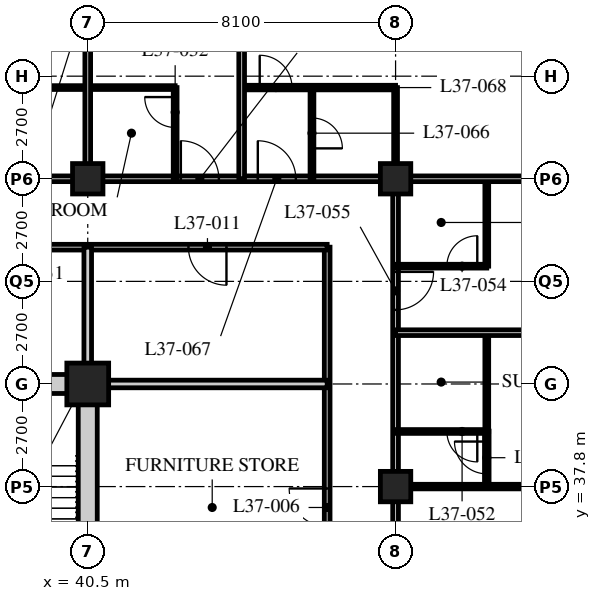
"""IFC4 building model, lengths in metres.
Left out: names, types, materials, properties, quantities, classifications, styles, units other than length and angle.
Written with IfcOpenShell. Run it as: python <this file> out.ifc"""

import sys

from ifc_helpers import new_model, si_unit, direction, frame, frame_2d, origin, origin_2d, place, context, subcontext, project, spatial, rectangle, hollow_rectangle, extrude, element, fill, save


model = new_model("IFC4")
c1 = context("Model", 3, precision=1e-05, world=origin(), true_north=direction((0.0, 1.0)))
c2 = subcontext(c1, "Body", "Model", "MODEL_VIEW")
j1 = project(units=[si_unit("LENGTHUNIT", "METRE"), si_unit("PLANEANGLEUNIT", "RADIAN")], contexts=[c1])
p1 = place(None, origin())
s1 = spatial("IfcSite", under=j1, at=p1, CompositionType="ELEMENT")
p2 = place(p1, origin())
s2 = spatial("IfcBuilding", under=s1, at=p2, CompositionType="ELEMENT")
p3 = place(p2, frame((0.0, 0.0, 144.2)))
s3 = spatial("IfcBuildingStorey", under=s2, at=p3, CompositionType="ELEMENT", Elevation=144.2)
p4 = place(p3, frame((40.5, 40.5, 0.0), z_axis=(0.0, 0.0, 1.0), x_axis=(1.0, 0.0, 0.0)))
e1 = element("IfcColumn", 1, at=p4, inside=s3, PredefinedType="COLUMN", context=c2, shape_type="SweptSolid", body=[
    extrude(hollow_rectangle(XDim=1.1, YDim=1.1, WallThickness=0.1, at=origin_2d()), origin(), (0.0, 0.0, 1.0), 3.4),
])
for number, where, z_axis, x_axis in (
    (2, (40.5, 45.9, 0.0), (0.0, 0.0, 1.0), (1.0, 0.0, 0.0)),
    (3, (48.6, 37.8, 0.0), (0.0, 0.0, 1.0), (1.0, 0.0, 0.0)),
    (4, (48.6, 45.9, 0.0), (0.0, 0.0, 1.0), (1.0, 0.0, 0.0)),
):
    element("IfcColumn", number, at=place(p3, frame(where, z_axis=z_axis, x_axis=x_axis)), inside=s3, PredefinedType="COLUMN", context=c2, shape_type="SweptSolid", body=[
        extrude(hollow_rectangle(XDim=0.8, YDim=0.8, WallThickness=0.08, at=origin_2d()), origin(), (0.0, 0.0, 1.0), 3.4),
    ])
p5 = place(p3, frame((12.15, 45.9, 0.0), z_axis=(0.0, 0.0, 1.0), x_axis=(1.0, 0.0, 0.0)))
e5 = element("IfcWall", 5, at=p5, inside=s3, PredefinedType="PARTITIONING", context=c2, shape_type="SweptSolid", body=[
    extrude(rectangle(XDim=36.45, YDim=0.15, at=frame_2d((18.225, 0.0))), origin(), (0.0, 0.0, 1.0), 2.42),
])
p6 = place(p5, frame((9.225, 0.0, 0.0)))
e6 = element("IfcOpeningElement", 6, at=p6, cuts=e5, PredefinedType="OPENING", context=c2, shape_type="SweptSolid", body=[
    extrude(rectangle(XDim=1.8, YDim=2.4, at=frame_2d((0.9, 1.2))), frame((0.0, 0.085, 0.0), z_axis=(0.0, -1.0, 0.0), x_axis=(1.0, 0.0, 0.0)), (0.0, 0.0, 1.0), 0.17),
])
p7 = place(p5, frame((21.65, 0.0, 0.0)))
e7 = element("IfcOpeningElement", 7, at=p7, cuts=e5, PredefinedType="OPENING", context=c2, shape_type="SweptSolid", body=[
    extrude(rectangle(XDim=1.0, YDim=2.1, at=frame_2d((0.5, 1.05))), frame((0.0, 0.085, 0.0), z_axis=(0.0, -1.0, 0.0), x_axis=(1.0, 0.0, 0.0)), (0.0, 0.0, 1.0), 0.17),
])
p8 = place(p5, frame((24.9, 0.0, 0.0)))
e8 = element("IfcOpeningElement", 8, at=p8, cuts=e5, PredefinedType="OPENING", context=c2, shape_type="SweptSolid", body=[
    extrude(rectangle(XDim=1.0, YDim=2.1, at=frame_2d((0.5, 1.05))), frame((0.0, 0.085, 0.0), z_axis=(0.0, -1.0, 0.0), x_axis=(1.0, 0.0, 0.0)), (0.0, 0.0, 1.0), 0.17),
])
p9 = place(p5, frame((30.8, 0.0, 0.0)))
e9 = element("IfcOpeningElement", 9, at=p9, cuts=e5, PredefinedType="OPENING", context=c2, shape_type="SweptSolid", body=[
    extrude(rectangle(XDim=1.0, YDim=2.1, at=frame_2d((0.5, 1.05))), frame((0.0, 0.085, 0.0), z_axis=(0.0, -1.0, 0.0), x_axis=(1.0, 0.0, 0.0)), (0.0, 0.0, 1.0), 0.17),
])
p10 = place(p5, frame((32.825, 0.0, 0.0)))
e10 = element("IfcOpeningElement", 10, at=p10, cuts=e5, PredefinedType="OPENING", context=c2, shape_type="SweptSolid", body=[
    extrude(rectangle(XDim=1.0, YDim=2.1, at=frame_2d((0.5, 1.05))), frame((0.0, 0.085, 0.0), z_axis=(0.0, -1.0, 0.0), x_axis=(1.0, 0.0, 0.0)), (0.0, 0.0, 1.0), 0.17),
])
p11 = place(p5, frame((1.525, 0.0, 0.0)))
e11 = element("IfcOpeningElement", 11, at=p11, cuts=e5, PredefinedType="OPENING", context=c2, shape_type="SweptSolid", body=[
    extrude(rectangle(XDim=1.0, YDim=2.1, at=frame_2d((0.5, 1.05))), frame((0.0, 0.085, 0.0), z_axis=(0.0, -1.0, 0.0), x_axis=(1.0, 0.0, 0.0)), (0.0, 0.0, 1.0), 0.17),
])
p12 = place(p3, frame((48.6, 21.6, 0.0), z_axis=(0.0, 0.0, 1.0), x_axis=(0.0, 1.0, 0.0)))
e12 = element("IfcWall", 12, at=p12, inside=s3, PredefinedType="PARTITIONING", context=c2, shape_type="SweptSolid", body=[
    extrude(rectangle(XDim=24.3, YDim=0.15, at=frame_2d((12.15, 0.0))), origin(), (0.0, 0.0, 1.0), 2.42),
])
p13 = place(p12, frame((2.75, 0.0, 0.0)))
e13 = element("IfcOpeningElement", 13, at=p13, cuts=e12, PredefinedType="OPENING", context=c2, shape_type="SweptSolid", body=[
    extrude(rectangle(XDim=1.0, YDim=2.1, at=frame_2d((0.5, 1.05))), frame((0.0, 0.085, 0.0), z_axis=(0.0, -1.0, 0.0), x_axis=(1.0, 0.0, 0.0)), (0.0, 0.0, 1.0), 0.17),
])
p14 = place(p12, frame((4.65, 0.0, 0.0)))
e14 = element("IfcOpeningElement", 14, at=p14, cuts=e12, PredefinedType="OPENING", context=c2, shape_type="SweptSolid", body=[
    extrude(rectangle(XDim=1.0, YDim=2.1, at=frame_2d((0.5, 1.05))), frame((0.0, 0.085, 0.0), z_axis=(0.0, -1.0, 0.0), x_axis=(1.0, 0.0, 0.0)), (0.0, 0.0, 1.0), 0.17),
])
p15 = place(p12, frame((13.675, 0.0, 0.0)))
e15 = element("IfcOpeningElement", 15, at=p15, cuts=e12, PredefinedType="OPENING", context=c2, shape_type="SweptSolid", body=[
    extrude(rectangle(XDim=1.0, YDim=2.1, at=frame_2d((0.5, 1.05))), frame((0.0, 0.085, 0.0), z_axis=(0.0, -1.0, 0.0), x_axis=(1.0, 0.0, 0.0)), (0.0, 0.0, 1.0), 0.17),
])
p16 = place(p12, frame((20.85, 0.0, 0.0)))
e16 = element("IfcOpeningElement", 16, at=p16, cuts=e12, PredefinedType="OPENING", context=c2, shape_type="SweptSolid", body=[
    extrude(rectangle(XDim=1.0, YDim=2.1, at=frame_2d((0.5, 1.05))), frame((0.0, 0.085, 0.0), z_axis=(0.0, -1.0, 0.0), x_axis=(1.0, 0.0, 0.0)), (0.0, 0.0, 1.0), 0.17),
])
p17 = place(p3, frame((46.8, 24.3, 0.0), z_axis=(0.0, 0.0, 1.0), x_axis=(0.0, 1.0, 0.0)))
e17 = element("IfcWall", 17, at=p17, inside=s3, PredefinedType="PARTITIONING", context=c2, shape_type="SweptSolid", body=[
    extrude(rectangle(XDim=19.8, YDim=0.15, at=frame_2d((9.9, 0.0))), origin(), (0.0, 0.0, 1.0), 3.19),
])
p18 = place(p17, frame((0.929, 0.0, 0.0)))
e18 = element("IfcOpeningElement", 18, at=p18, cuts=e17, PredefinedType="OPENING", context=c2, shape_type="SweptSolid", body=[
    extrude(rectangle(XDim=1.0, YDim=2.1, at=frame_2d((0.5, 1.05))), frame((0.0, 0.085, 0.0), z_axis=(0.0, -1.0, 0.0), x_axis=(1.0, 0.0, 0.0)), (0.0, 0.0, 1.0), 0.17),
])
p19 = place(p17, frame((4.979, 0.0, 0.0)))
e19 = element("IfcOpeningElement", 19, at=p19, cuts=e17, PredefinedType="OPENING", context=c2, shape_type="SweptSolid", body=[
    extrude(rectangle(XDim=1.0, YDim=2.1, at=frame_2d((0.5, 1.05))), frame((0.0, 0.085, 0.0), z_axis=(0.0, -1.0, 0.0), x_axis=(1.0, 0.0, 0.0)), (0.0, 0.0, 1.0), 0.17),
])
p20 = place(p17, frame((8.4, 0.0, 0.0)))
e20 = element("IfcOpeningElement", 20, at=p20, cuts=e17, PredefinedType="OPENING", context=c2, shape_type="SweptSolid", body=[
    extrude(rectangle(XDim=1.0, YDim=2.1, at=frame_2d((0.5, 1.05))), frame((0.0, 0.085, 0.0), z_axis=(0.0, -1.0, 0.0), x_axis=(1.0, 0.0, 0.0)), (0.0, 0.0, 1.0), 0.17),
])
p21 = place(p17, frame((12.45, 0.0, 0.0)))
e21 = element("IfcOpeningElement", 21, at=p21, cuts=e17, PredefinedType="OPENING", context=c2, shape_type="SweptSolid", body=[
    extrude(rectangle(XDim=1.0, YDim=2.1, at=frame_2d((0.5, 1.05))), frame((0.0, 0.085, 0.0), z_axis=(0.0, -1.0, 0.0), x_axis=(1.0, 0.0, 0.0)), (0.0, 0.0, 1.0), 0.17),
])
p22 = place(p3, frame((46.8, 44.1, 0.0), z_axis=(0.0, 0.0, 1.0), x_axis=(-1.0, 0.0, 0.0)))
e22 = element("IfcWall", 22, at=p22, inside=s3, PredefinedType="PARTITIONING", context=c2, shape_type="SweptSolid", body=[
    extrude(rectangle(XDim=17.24, YDim=0.15, at=frame_2d((8.62, 0.0))), origin(), (0.0, 0.0, 1.0), 3.19),
])
p23 = place(p22, frame((15.361, 0.0, 0.0)))
e23 = element("IfcOpeningElement", 23, at=p23, cuts=e22, PredefinedType="OPENING", context=c2, shape_type="SweptSolid", body=[
    extrude(rectangle(XDim=1.0, YDim=2.1, at=frame_2d((0.5, 1.05))), frame((0.0, 0.085, 0.0), z_axis=(0.0, -1.0, 0.0), x_axis=(1.0, 0.0, 0.0)), (0.0, 0.0, 1.0), 0.17),
])
p24 = place(p22, frame((9.886, 0.0, 0.0)))
e24 = element("IfcOpeningElement", 24, at=p24, cuts=e22, PredefinedType="OPENING", context=c2, shape_type="SweptSolid", body=[
    extrude(rectangle(XDim=1.0, YDim=2.1, at=frame_2d((0.5, 1.05))), frame((0.0, 0.085, 0.0), z_axis=(0.0, -1.0, 0.0), x_axis=(1.0, 0.0, 0.0)), (0.0, 0.0, 1.0), 0.17),
])
p25 = place(p22, frame((2.65, 0.0, 0.0)))
e25 = element("IfcOpeningElement", 25, at=p25, cuts=e22, PredefinedType="OPENING", context=c2, shape_type="SweptSolid", body=[
    extrude(rectangle(XDim=1.0, YDim=2.1, at=frame_2d((0.5, 1.05))), frame((0.0, 0.085, 0.0), z_axis=(0.0, -1.0, 0.0), x_axis=(1.0, 0.0, 0.0)), (0.0, 0.0, 1.0), 0.17),
])
p26 = place(p3, frame((40.5, 40.5, 0.0), z_axis=(0.0, 0.0, 1.0), x_axis=(0.0, 1.0, 0.0)))
e26 = element("IfcWall", 26, at=p26, inside=s3, PredefinedType="SOLIDWALL", context=c2, shape_type="SweptSolid", body=[
    extrude(rectangle(XDim=3.6, YDim=0.2, at=frame_2d((1.8, 0.0))), origin(), (0.0, 0.0, 1.0), 2.42),
])
p27 = place(p3, frame((40.5, 40.5, 0.0), z_axis=(0.0, 0.0, 1.0), x_axis=(1.0, 0.0, 0.0)))
e27 = element("IfcWall", 27, at=p27, inside=s3, PredefinedType="SOLIDWALL", context=c2, shape_type="SweptSolid", body=[
    extrude(rectangle(XDim=6.3, YDim=0.2, at=frame_2d((3.15, 0.0))), origin(), (0.0, 0.0, 1.0), 3.19),
])
p28 = place(p3, frame((38.2, 48.3, 0.0), z_axis=(0.0, 0.0, 1.0), x_axis=(1.0, 0.0, 0.0)))
e28 = element("IfcWall", 28, at=p28, inside=s3, PredefinedType="PARTITIONING", context=c2, shape_type="SweptSolid", body=[
    extrude(rectangle(XDim=4.6, YDim=0.1, at=frame_2d((2.3, 0.0))), origin(), (0.0, 0.0, 1.0), 3.19),
])
p29 = place(p3, frame((40.5, 45.9, 0.0), z_axis=(0.0, 0.0, 1.0), x_axis=(0.0, 1.0, 0.0)))
e29 = element("IfcWall", 29, at=p29, inside=s3, PredefinedType="PARTITIONING", context=c2, shape_type="SweptSolid", body=[
    extrude(rectangle(XDim=7.8, YDim=0.15, at=frame_2d((3.9, 0.0))), origin(), (0.0, 0.0, 1.0), 2.42),
])
p30 = place(p3, frame((42.8, 45.9, 0.0), z_axis=(0.0, 0.0, 1.0), x_axis=(0.0, 1.0, 0.0)))
e30 = element("IfcWall", 30, at=p30, inside=s3, PredefinedType="PARTITIONING", context=c2, shape_type="SweptSolid", body=[
    extrude(rectangle(XDim=2.4, YDim=0.1, at=frame_2d((1.2, 0.0))), origin(), (0.0, 0.0, 1.0), 3.19),
])
p31 = place(p30, frame((1.35, 0.0, 0.0)))
e31 = element("IfcOpeningElement", 31, at=p31, cuts=e30, PredefinedType="OPENING", context=c2, shape_type="SweptSolid", body=[
    extrude(rectangle(XDim=0.8, YDim=2.1, at=frame_2d((0.4, 1.05))), frame((0.0, 0.06, 0.0), z_axis=(0.0, -1.0, 0.0), x_axis=(1.0, 0.0, 0.0)), (0.0, 0.0, 1.0), 0.12),
])
p32 = place(p3, frame((51.0, 39.25, 0.0), z_axis=(0.0, 0.0, 1.0), x_axis=(0.0, 1.0, 0.0)))
e32 = element("IfcWall", 32, at=p32, inside=s3, PredefinedType="PARTITIONING", context=c2, shape_type="SweptSolid", body=[
    extrude(rectangle(XDim=2.6, YDim=0.1, at=frame_2d((1.3, 0.0))), origin(), (0.0, 0.0, 1.0), 3.19),
])
p33 = place(p3, frame((48.6, 39.25, 0.0), z_axis=(0.0, 0.0, 1.0), x_axis=(1.0, 0.0, 0.0)))
e33 = element("IfcWall", 33, at=p33, inside=s3, PredefinedType="PARTITIONING", context=c2, shape_type="SweptSolid", body=[
    extrude(rectangle(XDim=2.4, YDim=0.1, at=frame_2d((1.2, 0.0))), origin(), (0.0, 0.0, 1.0), 3.19),
])
p34 = place(p33, frame((1.35, 0.0, 0.0)))
e34 = element("IfcOpeningElement", 34, at=p34, cuts=e33, PredefinedType="OPENING", context=c2, shape_type="SweptSolid", body=[
    extrude(rectangle(XDim=0.8, YDim=2.1, at=frame_2d((0.4, 1.05))), frame((0.0, 0.06, 0.0), z_axis=(0.0, -1.0, 0.0), x_axis=(1.0, 0.0, 0.0)), (0.0, 0.0, 1.0), 0.12),
])
p35 = place(p3, frame((48.6, 37.8, 0.0), z_axis=(0.0, 0.0, 1.0), x_axis=(1.0, 0.0, 0.0)))
e35 = element("IfcWall", 35, at=p35, inside=s3, PredefinedType="PARTITIONING", context=c2, shape_type="SweptSolid", body=[
    extrude(rectangle(XDim=7.8, YDim=0.12, at=frame_2d((3.9, 0.0))), origin(), (0.0, 0.0, 1.0), 2.42),
])
p36 = place(p35, frame((4.825, 0.0, 0.0)))
e36 = element("IfcOpeningElement", 36, at=p36, cuts=e35, PredefinedType="OPENING", context=c2, shape_type="SweptSolid", body=[
    extrude(rectangle(XDim=0.85, YDim=2.1, at=frame_2d((0.425, 1.05))), frame((0.0, 0.07, 0.0), z_axis=(0.0, -1.0, 0.0), x_axis=(1.0, 0.0, 0.0)), (0.0, 0.0, 1.0), 0.14),
])
p37 = place(p3, frame((48.6, 41.85, 0.0), z_axis=(0.0, 0.0, 1.0), x_axis=(1.0, 0.0, 0.0)))
e37 = element("IfcWall", 37, at=p37, inside=s3, PredefinedType="PARTITIONING", context=c2, shape_type="SweptSolid", body=[
    extrude(rectangle(XDim=7.8, YDim=0.15, at=frame_2d((3.9, 0.0))), origin(), (0.0, 0.0, 1.0), 3.19),
])
p38 = place(p3, frame((51.0, 43.6, 0.0), z_axis=(0.0, 0.0, 1.0), x_axis=(0.0, 1.0, 0.0)))
e38 = element("IfcWall", 38, at=p38, inside=s3, PredefinedType="PARTITIONING", context=c2, shape_type="SweptSolid", body=[
    extrude(rectangle(XDim=2.3, YDim=0.1, at=frame_2d((1.15, 0.0))), origin(), (0.0, 0.0, 1.0), 3.19),
])
p39 = place(p3, frame((48.6, 43.6, 0.0), z_axis=(0.0, 0.0, 1.0), x_axis=(1.0, 0.0, 0.0)))
e39 = element("IfcWall", 39, at=p39, inside=s3, PredefinedType="PARTITIONING", context=c2, shape_type="SweptSolid", body=[
    extrude(rectangle(XDim=2.4, YDim=0.1, at=frame_2d((1.2, 0.0))), origin(), (0.0, 0.0, 1.0), 3.19),
])
p40 = place(p39, frame((1.35, 0.0, 0.0)))
e40 = element("IfcOpeningElement", 40, at=p40, cuts=e39, PredefinedType="OPENING", context=c2, shape_type="SweptSolid", body=[
    extrude(rectangle(XDim=0.8, YDim=2.1, at=frame_2d((0.4, 1.05))), frame((0.0, 0.06, 0.0), z_axis=(0.0, -1.0, 0.0), x_axis=(1.0, 0.0, 0.0)), (0.0, 0.0, 1.0), 0.12),
])
p41 = place(p3, frame((44.55, 48.3, 0.0), z_axis=(0.0, 0.0, 1.0), x_axis=(1.0, 0.0, 0.0)))
e41 = element("IfcWall", 41, at=p41, inside=s3, PredefinedType="PARTITIONING", context=c2, shape_type="SweptSolid", body=[
    extrude(rectangle(XDim=4.05, YDim=0.12, at=frame_2d((2.025, 0.0))), origin(), (0.0, 0.0, 1.0), 3.19),
])
p42 = place(p41, frame((0.475, 0.0, 0.0)))
e42 = element("IfcOpeningElement", 42, at=p42, cuts=e41, PredefinedType="OPENING", context=c2, shape_type="SweptSolid", body=[
    extrude(rectangle(XDim=0.85, YDim=2.1, at=frame_2d((0.425, 1.05))), frame((0.0, 0.07, 0.0), z_axis=(0.0, -1.0, 0.0), x_axis=(1.0, 0.0, 0.0)), (0.0, 0.0, 1.0), 0.14),
])
p43 = place(p3, frame((46.4, 45.9, 0.0), z_axis=(0.0, 0.0, 1.0), x_axis=(0.0, 1.0, 0.0)))
e43 = element("IfcWall", 43, at=p43, inside=s3, PredefinedType="PARTITIONING", context=c2, shape_type="SweptSolid", body=[
    extrude(rectangle(XDim=2.4, YDim=0.1, at=frame_2d((1.2, 0.0))), origin(), (0.0, 0.0, 1.0), 3.19),
])
p44 = place(p43, frame((0.8, 0.0, 0.0)))
e44 = element("IfcOpeningElement", 44, at=p44, cuts=e43, PredefinedType="OPENING", context=c2, shape_type="SweptSolid", body=[
    extrude(rectangle(XDim=0.8, YDim=2.1, at=frame_2d((0.4, 1.05))), frame((0.0, 0.06, 0.0), z_axis=(0.0, -1.0, 0.0), x_axis=(1.0, 0.0, 0.0)), (0.0, 0.0, 1.0), 0.12),
])
p45 = place(p3, frame((48.6, 45.9, 0.0), z_axis=(0.0, 0.0, 1.0), x_axis=(0.0, 1.0, 0.0)))
e45 = element("IfcWall", 45, at=p45, inside=s3, PredefinedType="PARTITIONING", context=c2, shape_type="SweptSolid", body=[
    extrude(rectangle(XDim=2.4, YDim=0.1, at=frame_2d((1.2, 0.0))), origin(), (0.0, 0.0, 1.0), 2.42),
])
p46 = place(p3, frame((48.6, 45.9, 0.0), z_axis=(0.0, 0.0, 1.0), x_axis=(1.0, 0.0, 0.0)))
e46 = element("IfcWall", 46, at=p46, inside=s3, PredefinedType="PARTITIONING", context=c2, shape_type="SweptSolid", body=[
    extrude(rectangle(XDim=3.75, YDim=0.15, at=frame_2d((1.875, 0.0))), origin(), (0.0, 0.0, 1.0), 2.42),
])
p47 = place(p3, frame((44.55, 45.9, 0.0), z_axis=(0.0, 0.0, 1.0), x_axis=(0.0, 1.0, 0.0)))
e47 = element("IfcWall", 47, at=p47, inside=s3, PredefinedType="PARTITIONING", context=c2, shape_type="SweptSolid", body=[
    extrude(rectangle(XDim=7.8, YDim=0.15, at=frame_2d((3.9, 0.0))), origin(), (0.0, 0.0, 1.0), 3.19),
])
p48 = place(p3, frame((51.0, 39.26, 0.0), z_axis=(0.0, 0.0, 1.0), x_axis=(0.0, -1.0, 0.0)))
e48 = element("IfcWall", 48, at=p48, inside=s3, PredefinedType="PARTITIONING", context=c2, shape_type="SweptSolid", body=[
    extrude(rectangle(XDim=1.46, YDim=0.12, at=frame_2d((0.73, 0.0))), origin(), (0.0, 0.0, 1.0), 3.19),
])
p49 = place(p48, frame((0.275, 0.0, 0.0)))
e49 = element("IfcOpeningElement", 49, at=p49, cuts=e48, PredefinedType="OPENING", context=c2, shape_type="SweptSolid", body=[
    extrude(rectangle(XDim=0.85, YDim=2.1, at=frame_2d((0.425, 1.05))), frame((0.0, 0.07, 0.0), z_axis=(0.0, -1.0, 0.0), x_axis=(1.0, 0.0, 0.0)), (0.0, 0.0, 1.0), 0.14),
])
p50 = place(p3, frame((15.95, 40.5, 0.0), z_axis=(0.0, 0.0, 1.0), x_axis=(1.0, 0.0, 0.0)))
e50 = element("IfcWall", 50, at=p50, inside=s3, PredefinedType="SOLIDWALL", context=c2, shape_type="SweptSolid", body=[
    extrude(rectangle(XDim=24.8, YDim=0.5, at=frame_2d((12.4, 0.0))), origin(), (0.0, 0.0, 1.0), 2.42),
])
p51 = place(p50, frame((11.5, 0.0, 0.0)))
e51 = element("IfcOpeningElement", 51, at=p51, cuts=e50, PredefinedType="OPENING", context=c2, shape_type="SweptSolid", body=[
    extrude(rectangle(XDim=1.8, YDim=2.4, at=frame_2d((0.9, 1.2))), frame((0.0, 0.26, 0.0), z_axis=(0.0, -1.0, 0.0), x_axis=(1.0, 0.0, 0.0)), (0.0, 0.0, 1.0), 0.52),
])
p52 = place(p3, frame((40.5, 24.55, 0.0), z_axis=(0.0, 0.0, 1.0), x_axis=(0.0, 1.0, 0.0)))
e52 = element("IfcWall", 52, at=p52, inside=s3, PredefinedType="SOLIDWALL", context=c2, shape_type="SweptSolid", body=[
    extrude(rectangle(XDim=15.7, YDim=0.5, at=frame_2d((7.85, 0.0))), origin(), (0.0, 0.0, 1.0), 2.42),
])
p53 = place(p21, origin())
e53 = element("IfcDoor", 53, at=p53, inside=s3, OperationType="SINGLE_SWING_RIGHT", PredefinedType="DOOR", context=c2, shape_type="SweptSolid", body=[
    extrude(rectangle(XDim=1.0, YDim=2.1, at=frame_2d((0.5, 1.05))), frame((0.0, 0.025, 0.0), z_axis=(0.0, -1.0, 0.0), x_axis=(1.0, 0.0, 0.0)), (0.0, 0.0, 1.0), 0.05),
])
fill(e21, e53)
p54 = place(p25, origin())
e54 = element("IfcDoor", 54, at=p54, inside=s3, OperationType="SINGLE_SWING_LEFT", PredefinedType="DOOR", context=c2, shape_type="SweptSolid", body=[
    extrude(rectangle(XDim=1.0, YDim=2.1, at=frame_2d((0.5, 1.05))), frame((0.0, 0.025, 0.0), z_axis=(0.0, -1.0, 0.0), x_axis=(1.0, 0.0, 0.0)), (0.0, 0.0, 1.0), 0.05),
])
fill(e25, e54)
p55 = place(p31, origin())
e55 = element("IfcDoor", 55, at=p55, inside=s3, OperationType="SINGLE_SWING_RIGHT", PredefinedType="DOOR", context=c2, shape_type="SweptSolid", body=[
    extrude(rectangle(XDim=0.8, YDim=2.1, at=frame_2d((0.4, 1.05))), frame((0.0, 0.025, 0.0), z_axis=(0.0, -1.0, 0.0), x_axis=(1.0, 0.0, 0.0)), (0.0, 0.0, 1.0), 0.05),
])
fill(e31, e55)
p56 = place(p9, origin())
e56 = element("IfcDoor", 56, at=p56, inside=s3, OperationType="SINGLE_SWING_LEFT", PredefinedType="DOOR", context=c2, shape_type="SweptSolid", body=[
    extrude(rectangle(XDim=1.0, YDim=2.1, at=frame_2d((0.5, 1.05))), frame((0.0, 0.025, 0.0), z_axis=(0.0, -1.0, 0.0), x_axis=(1.0, 0.0, 0.0)), (0.0, 0.0, 1.0), 0.05),
])
fill(e9, e56)
p57 = place(p34, origin())
e57 = element("IfcDoor", 57, at=p57, inside=s3, OperationType="SINGLE_SWING_LEFT", PredefinedType="DOOR", context=c2, shape_type="SweptSolid", body=[
    extrude(rectangle(XDim=0.8, YDim=2.1, at=frame_2d((0.4, 1.05))), frame((0.0, 0.025, 0.0), z_axis=(0.0, -1.0, 0.0), x_axis=(1.0, 0.0, 0.0)), (0.0, 0.0, 1.0), 0.05),
])
fill(e34, e57)
p58 = place(p40, origin())
e58 = element("IfcDoor", 58, at=p58, inside=s3, OperationType="SINGLE_SWING_RIGHT", PredefinedType="DOOR", context=c2, shape_type="SweptSolid", body=[
    extrude(rectangle(XDim=0.8, YDim=2.1, at=frame_2d((0.4, 1.05))), frame((0.0, 0.025, 0.0), z_axis=(0.0, -1.0, 0.0), x_axis=(1.0, 0.0, 0.0)), (0.0, 0.0, 1.0), 0.05),
])
fill(e40, e58)
p59 = place(p16, origin())
e59 = element("IfcDoor", 59, at=p59, inside=s3, OperationType="SINGLE_SWING_LEFT", PredefinedType="DOOR", context=c2, shape_type="SweptSolid", body=[
    extrude(rectangle(XDim=1.0, YDim=2.1, at=frame_2d((0.5, 1.05))), frame((0.0, 0.025, 0.0), z_axis=(0.0, -1.0, 0.0), x_axis=(1.0, 0.0, 0.0)), (0.0, 0.0, 1.0), 0.05),
])
fill(e16, e59)
p60 = place(p44, origin())
e60 = element("IfcDoor", 60, at=p60, inside=s3, OperationType="SINGLE_SWING_RIGHT", PredefinedType="DOOR", context=c2, shape_type="SweptSolid", body=[
    extrude(rectangle(XDim=0.8, YDim=2.1, at=frame_2d((0.4, 1.05))), frame((0.0, 0.025, 0.0), z_axis=(0.0, -1.0, 0.0), x_axis=(1.0, 0.0, 0.0)), (0.0, 0.0, 1.0), 0.05),
])
fill(e44, e60)
p61 = place(p10, origin())
e61 = element("IfcDoor", 61, at=p61, inside=s3, OperationType="SINGLE_SWING_LEFT", PredefinedType="DOOR", context=c2, shape_type="SweptSolid", body=[
    extrude(rectangle(XDim=1.0, YDim=2.1, at=frame_2d((0.5, 1.05))), frame((0.0, 0.025, 0.0), z_axis=(0.0, -1.0, 0.0), x_axis=(1.0, 0.0, 0.0)), (0.0, 0.0, 1.0), 0.05),
])
fill(e10, e61)
p62 = place(p42, origin())
e62 = element("IfcDoor", 62, at=p62, inside=s3, OperationType="SINGLE_SWING_LEFT", PredefinedType="DOOR", context=c2, shape_type="SweptSolid", body=[
    extrude(rectangle(XDim=0.85, YDim=2.1, at=frame_2d((0.425, 1.05))), frame((0.0, 0.025, 0.0), z_axis=(0.0, -1.0, 0.0), x_axis=(1.0, 0.0, 0.0)), (0.0, 0.0, 1.0), 0.05),
])
fill(e42, e62)
p63 = place(p49, origin())
e63 = element("IfcDoor", 63, at=p63, inside=s3, OperationType="SINGLE_SWING_RIGHT", PredefinedType="DOOR", context=c2, shape_type="SweptSolid", body=[
    extrude(rectangle(XDim=0.85, YDim=2.1, at=frame_2d((0.425, 1.05))), frame((0.0, 0.025, 0.0), z_axis=(0.0, -1.0, 0.0), x_axis=(1.0, 0.0, 0.0)), (0.0, 0.0, 1.0), 0.05),
])
fill(e49, e63)
save(model, sys.argv[1])
